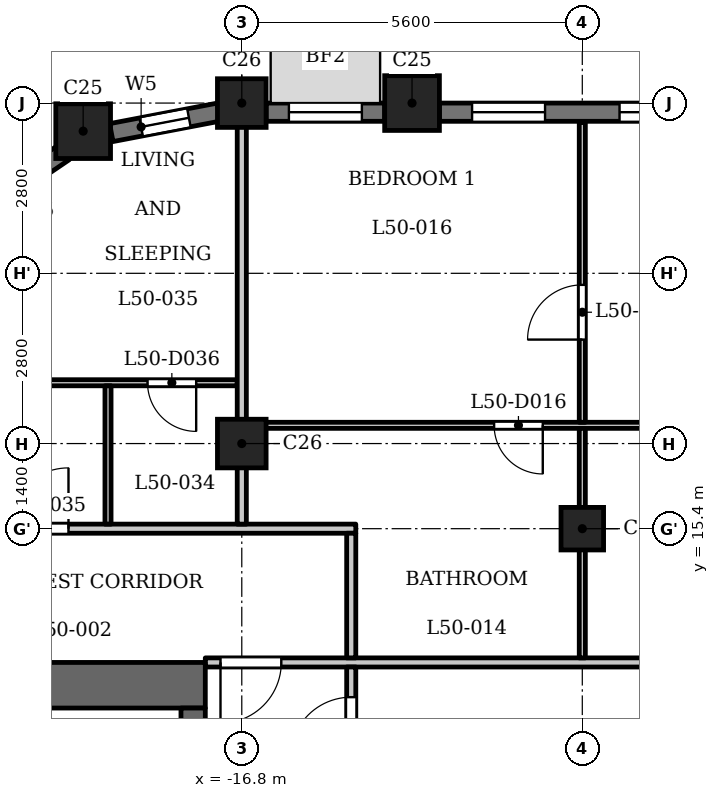
"""IFC4 building model, lengths in metres.
Left out: names, types, materials, properties, quantities, classifications, styles, units other than length and angle.
Written with IfcOpenShell. Run it as: python <this file> out.ifc"""

import sys

from ifc_helpers import new_model, si_unit, direction, frame, frame_2d, origin, origin_2d, place, context, subcontext, project, spatial, rectangle, extrude, element, fill, save


model = new_model("IFC4")
c1 = context("Model", 3, precision=1e-05, world=origin(), true_north=direction((0.0, 1.0)))
c2 = subcontext(c1, "Body", "Model", "MODEL_VIEW")
j1 = project(units=[si_unit("LENGTHUNIT", "METRE"), si_unit("PLANEANGLEUNIT", "RADIAN")], contexts=[c1])
p1 = place(None, origin())
s1 = spatial("IfcSite", under=j1, at=p1, CompositionType="ELEMENT")
p2 = place(p1, origin())
s2 = spatial("IfcBuilding", under=s1, at=p2, CompositionType="ELEMENT")
p3 = place(p2, frame((0.0, 0.0, 195.9)))
s3 = spatial("IfcBuildingStorey", under=s2, at=p3, CompositionType="ELEMENT", Elevation=195.9)
for number, where, z_axis, x_axis in (
    (1, (-14.0, 22.4, 0.0), (0.0, 0.0, 1.0), (1.0, 0.0, 0.0)),
    (2, (-19.409, 21.938, 0.0), (0.0, 0.0, 1.0), (1.0, 0.0, 0.0)),
):
    element("IfcColumn", number, at=place(p3, frame(where, z_axis=z_axis, x_axis=x_axis)), inside=s3, PredefinedType="COLUMN", context=c2, shape_type="SweptSolid", body=[
        extrude(rectangle(XDim=0.9, YDim=0.9, at=origin_2d()), origin(), (0.0, 0.0, 1.0), 3.5),
    ])
for number, where, z_axis, x_axis in (
    (3, (-16.8, 16.8, 0.0), (0.0, 0.0, 1.0), (1.0, 0.0, 0.0)),
    (4, (-16.8, 22.4, 0.0), (0.0, 0.0, 1.0), (1.0, 0.0, 0.0)),
):
    element("IfcColumn", number, at=place(p3, frame(where, z_axis=z_axis, x_axis=x_axis)), inside=s3, PredefinedType="COLUMN", context=c2, shape_type="SweptSolid", body=[
        extrude(rectangle(XDim=0.8, YDim=0.8, at=origin_2d()), origin(), (0.0, 0.0, 1.0), 3.5),
    ])
p4 = place(p3, frame((-11.2, 15.4, 0.0), z_axis=(0.0, 0.0, 1.0), x_axis=(1.0, 0.0, 0.0)))
e5 = element("IfcColumn", 5, at=p4, inside=s3, PredefinedType="COLUMN", context=c2, shape_type="SweptSolid", body=[
    extrude(rectangle(XDim=0.7, YDim=0.7, at=origin_2d()), origin(), (0.0, 0.0, 1.0), 3.5),
])
p5 = place(p3, frame((-8.85, 22.25, 0.0), z_axis=(0.0, 0.0, 1.0), x_axis=(-1.0, 0.0, 0.0)))
e6 = element("IfcWall", 6, at=p5, inside=s3, PredefinedType="SOLIDWALL", context=c2, shape_type="SweptSolid", body=[
    extrude(rectangle(XDim=4.7, YDim=0.3, at=frame_2d((2.35, 0.0))), origin(), (0.0, 0.0, 1.0), 2.5),
])
p6 = place(p5, frame((0.538, 0.0, 0.6)))
e7 = element("IfcOpeningElement", 7, at=p6, cuts=e6, PredefinedType="OPENING", context=c2, shape_type="SweptSolid", body=[
    extrude(rectangle(XDim=1.2, YDim=1.55, at=frame_2d((0.6, 0.775))), frame((0.0, 0.16, 0.0), z_axis=(0.0, -1.0, 0.0), x_axis=(1.0, 0.0, 0.0)), (0.0, 0.0, 1.0), 0.32),
])
p7 = place(p5, frame((2.962, 0.0, 0.6)))
e8 = element("IfcOpeningElement", 8, at=p7, cuts=e6, PredefinedType="OPENING", context=c2, shape_type="SweptSolid", body=[
    extrude(rectangle(XDim=1.2, YDim=1.55, at=frame_2d((0.6, 0.775))), frame((0.0, 0.16, 0.0), z_axis=(0.0, -1.0, 0.0), x_axis=(1.0, 0.0, 0.0)), (0.0, 0.0, 1.0), 0.32),
])
p8 = place(p3, frame((-14.45, 22.25, 0.0), z_axis=(0.0, 0.0, 1.0), x_axis=(-1.0, 0.0, 0.0)))
e9 = element("IfcWall", 9, at=p8, inside=s3, PredefinedType="SOLIDWALL", context=c2, shape_type="SweptSolid", body=[
    extrude(rectangle(XDim=1.95, YDim=0.3, at=frame_2d((0.975, 0.0))), origin(), (0.0, 0.0, 1.0), 2.5),
])
p9 = place(p8, frame((0.375, 0.0, 0.6)))
e10 = element("IfcOpeningElement", 10, at=p9, cuts=e9, PredefinedType="OPENING", context=c2, shape_type="SweptSolid", body=[
    extrude(rectangle(XDim=1.2, YDim=1.55, at=frame_2d((0.6, 0.775))), frame((0.0, 0.16, 0.0), z_axis=(0.0, -1.0, 0.0), x_axis=(1.0, 0.0, 0.0)), (0.0, 0.0, 1.0), 0.32),
])
p10 = place(p3, frame((-17.179, 22.251, 0.0), z_axis=(0.0, 0.0, 1.0), x_axis=(-0.98230529033, -0.187286722942, 0.0)))
e11 = element("IfcWall", 11, at=p10, inside=s3, PredefinedType="SOLIDWALL", context=c2, shape_type="SweptSolid", body=[
    extrude(rectangle(XDim=1.799, YDim=0.3, at=frame_2d((0.899, 0.0))), origin(), (0.0, 0.0, 1.0), 2.5),
])
p11 = place(p10, frame((0.5, 0.0, 0.6)))
e12 = element("IfcOpeningElement", 12, at=p11, cuts=e11, PredefinedType="OPENING", context=c2, shape_type="SweptSolid", body=[
    extrude(rectangle(XDim=0.8, YDim=1.55, at=frame_2d((0.4, 0.775))), frame((0.0, 0.16, 0.0), z_axis=(0.0, -1.0, 0.0), x_axis=(1.0, 0.0, 0.0)), (0.0, 0.0, 1.0), 0.32),
])
p12 = place(p3, frame((-19.719, 21.594, 0.0), z_axis=(0.0, 0.0, 1.0), x_axis=(-0.827067282455, -0.562102935673, 0.0)))
e13 = element("IfcWall", 13, at=p12, inside=s3, PredefinedType="SOLIDWALL", context=c2, shape_type="SweptSolid", body=[
    extrude(rectangle(XDim=1.806, YDim=0.3, at=frame_2d((0.903, 0.0))), origin(), (0.0, 0.0, 1.0), 2.5),
])
p13 = place(p12, frame((0.503, 0.0, 0.6)))
e14 = element("IfcOpeningElement", 14, at=p13, cuts=e13, PredefinedType="OPENING", context=c2, shape_type="SweptSolid", body=[
    extrude(rectangle(XDim=0.8, YDim=1.55, at=frame_2d((0.4, 0.775))), frame((0.0, 0.16, 0.0), z_axis=(0.0, -1.0, 0.0), x_axis=(1.0, 0.0, 0.0)), (0.0, 0.0, 1.0), 0.32),
])
p14 = place(p3, frame((-17.4, 12.825, 0.0), z_axis=(0.0, 0.0, 1.0), x_axis=(-1.0, 0.0, 0.0)))
e15 = element("IfcWall", 15, at=p14, inside=s3, PredefinedType="SHEAR", context=c2, shape_type="SweptSolid", body=[
    extrude(rectangle(XDim=7.6, YDim=0.75, at=frame_2d((3.8, 0.0))), origin(), (0.0, 0.0, 1.0), 3.2),
])
p15 = place(p3, frame((-17.6, -12.45, 0.0), z_axis=(0.0, 0.0, 1.0), x_axis=(0.0, 1.0, 0.0)))
e16 = element("IfcWall", 16, at=p15, inside=s3, PredefinedType="SHEAR", context=c2, shape_type="SweptSolid", body=[
    extrude(rectangle(XDim=24.9, YDim=0.4, at=frame_2d((12.45, 0.0))), origin(), (0.0, 0.0, 1.0), 3.2),
])
p16 = place(p15, frame((6.325, 0.0, 0.0)))
e17 = element("IfcOpeningElement", 17, at=p16, cuts=e16, PredefinedType="OPENING", context=c2, shape_type="SweptSolid", body=[
    extrude(rectangle(XDim=0.9, YDim=2.1, at=frame_2d((0.45, 1.05))), frame((0.0, 0.21, 0.0), z_axis=(0.0, -1.0, 0.0), x_axis=(1.0, 0.0, 0.0)), (0.0, 0.0, 1.0), 0.42),
])
p17 = place(p15, frame((9.925, 0.0, 0.0)))
e18 = element("IfcOpeningElement", 18, at=p17, cuts=e16, PredefinedType="OPENING", context=c2, shape_type="SweptSolid", body=[
    extrude(rectangle(XDim=0.9, YDim=2.1, at=frame_2d((0.45, 1.05))), frame((0.0, 0.21, 0.0), z_axis=(0.0, -1.0, 0.0), x_axis=(1.0, 0.0, 0.0)), (0.0, 0.0, 1.0), 0.42),
])
p18 = place(p15, frame((15.6, 0.0, 0.0)))
e19 = element("IfcOpeningElement", 19, at=p18, cuts=e16, PredefinedType="OPENING", context=c2, shape_type="SweptSolid", body=[
    extrude(rectangle(XDim=1.1, YDim=2.1, at=frame_2d((0.55, 1.05))), frame((0.0, 0.21, 0.0), z_axis=(0.0, -1.0, 0.0), x_axis=(1.0, 0.0, 0.0)), (0.0, 0.0, 1.0), 0.42),
])
p19 = place(p15, frame((18.0, 0.0, 0.0)))
e20 = element("IfcOpeningElement", 20, at=p19, cuts=e16, PredefinedType="OPENING", context=c2, shape_type="SweptSolid", body=[
    extrude(rectangle(XDim=1.1, YDim=2.1, at=frame_2d((0.55, 1.05))), frame((0.0, 0.21, 0.0), z_axis=(0.0, -1.0, 0.0), x_axis=(1.0, 0.0, 0.0)), (0.0, 0.0, 1.0), 0.42),
])
p20 = place(p15, frame((23.025, 0.0, 0.0)))
e21 = element("IfcOpeningElement", 21, at=p20, cuts=e16, PredefinedType="OPENING", context=c2, shape_type="SweptSolid", body=[
    extrude(rectangle(XDim=1.1, YDim=2.1, at=frame_2d((0.55, 1.05))), frame((0.0, 0.21, 0.0), z_axis=(0.0, -1.0, 0.0), x_axis=(1.0, 0.0, 0.0)), (0.0, 0.0, 1.0), 0.42),
])
p21 = place(p15, frame((0.775, 0.0, 0.0)))
e22 = element("IfcOpeningElement", 22, at=p21, cuts=e16, PredefinedType="OPENING", context=c2, shape_type="SweptSolid", body=[
    extrude(rectangle(XDim=1.1, YDim=2.1, at=frame_2d((0.55, 1.05))), frame((0.0, 0.21, 0.0), z_axis=(0.0, -1.0, 0.0), x_axis=(1.0, 0.0, 0.0)), (0.0, 0.0, 1.0), 0.42),
])
p22 = place(p15, frame((12.925, 0.0, 0.0)))
e23 = element("IfcOpeningElement", 23, at=p22, cuts=e16, PredefinedType="OPENING", context=c2, shape_type="SweptSolid", body=[
    extrude(rectangle(XDim=1.8, YDim=2.1, at=frame_2d((0.9, 1.05))), frame((0.0, 0.21, 0.0), z_axis=(0.0, -1.0, 0.0), x_axis=(1.0, 0.0, 0.0)), (0.0, 0.0, 1.0), 0.42),
])
p23 = place(p3, frame((-17.4, 13.2, 0.0), z_axis=(0.0, 0.0, 1.0), x_axis=(1.0, 0.0, 0.0)))
e24 = element("IfcWall", 24, at=p23, inside=s3, PredefinedType="PARTITIONING", context=c2, shape_type="SweptSolid", body=[
    extrude(rectangle(XDim=34.8, YDim=0.15, at=frame_2d((17.4, 0.0))), origin(), (0.0, 0.0, 1.0), 3.2),
])
p24 = place(p23, frame((0.25, 0.0, 0.0)))
e25 = element("IfcOpeningElement", 25, at=p24, cuts=e24, PredefinedType="OPENING", context=c2, shape_type="SweptSolid", body=[
    extrude(rectangle(XDim=1.0, YDim=2.1, at=frame_2d((0.5, 1.05))), frame((0.0, 0.085, 0.0), z_axis=(0.0, -1.0, 0.0), x_axis=(1.0, 0.0, 0.0)), (0.0, 0.0, 1.0), 0.17),
])
p25 = place(p23, frame((33.65, 0.0, 0.0)))
e26 = element("IfcOpeningElement", 26, at=p25, cuts=e24, PredefinedType="OPENING", context=c2, shape_type="SweptSolid", body=[
    extrude(rectangle(XDim=1.0, YDim=2.1, at=frame_2d((0.5, 1.05))), frame((0.0, 0.085, 0.0), z_axis=(0.0, -1.0, 0.0), x_axis=(1.0, 0.0, 0.0)), (0.0, 0.0, 1.0), 0.17),
])
p26 = place(p23, frame((10.15, 0.0, 0.0)))
e27 = element("IfcOpeningElement", 27, at=p26, cuts=e24, PredefinedType="OPENING", context=c2, shape_type="SweptSolid", body=[
    extrude(rectangle(XDim=1.0, YDim=2.1, at=frame_2d((0.5, 1.05))), frame((0.0, 0.085, 0.0), z_axis=(0.0, -1.0, 0.0), x_axis=(1.0, 0.0, 0.0)), (0.0, 0.0, 1.0), 0.17),
])
p27 = place(p23, frame((13.55, 0.0, 0.0)))
e28 = element("IfcOpeningElement", 28, at=p27, cuts=e24, PredefinedType="OPENING", context=c2, shape_type="SweptSolid", body=[
    extrude(rectangle(XDim=1.0, YDim=2.1, at=frame_2d((0.5, 1.05))), frame((0.0, 0.085, 0.0), z_axis=(0.0, -1.0, 0.0), x_axis=(1.0, 0.0, 0.0)), (0.0, 0.0, 1.0), 0.17),
])
p28 = place(p23, frame((20.85, 0.0, 0.0)))
e29 = element("IfcOpeningElement", 29, at=p28, cuts=e24, PredefinedType="OPENING", context=c2, shape_type="SweptSolid", body=[
    extrude(rectangle(XDim=1.0, YDim=2.1, at=frame_2d((0.5, 1.05))), frame((0.0, 0.085, 0.0), z_axis=(0.0, -1.0, 0.0), x_axis=(1.0, 0.0, 0.0)), (0.0, 0.0, 1.0), 0.17),
])
p29 = place(p23, frame((23.7, 0.0, 0.0)))
e30 = element("IfcOpeningElement", 30, at=p29, cuts=e24, PredefinedType="OPENING", context=c2, shape_type="SweptSolid", body=[
    extrude(rectangle(XDim=1.0, YDim=2.1, at=frame_2d((0.5, 1.05))), frame((0.0, 0.085, 0.0), z_axis=(0.0, -1.0, 0.0), x_axis=(1.0, 0.0, 0.0)), (0.0, 0.0, 1.0), 0.17),
])
p30 = place(p3, frame((-24.684, 15.4, 0.0), z_axis=(0.0, 0.0, 1.0), x_axis=(1.0, 0.0, 0.0)))
e31 = element("IfcWall", 31, at=p30, inside=s3, PredefinedType="PARTITIONING", context=c2, shape_type="SweptSolid", body=[
    extrude(rectangle(XDim=9.759, YDim=0.15, at=frame_2d((4.879, 0.0))), origin(), (0.0, 0.0, 1.0), 3.2),
])
p31 = place(p30, frame((4.034, 0.0, 0.0)))
e32 = element("IfcOpeningElement", 32, at=p31, cuts=e31, PredefinedType="OPENING", context=c2, shape_type="SweptSolid", body=[
    extrude(rectangle(XDim=1.0, YDim=2.1, at=frame_2d((0.5, 1.05))), frame((0.0, 0.085, 0.0), z_axis=(0.0, -1.0, 0.0), x_axis=(1.0, 0.0, 0.0)), (0.0, 0.0, 1.0), 0.17),
])
p32 = place(p3, frame((-16.725, 17.1, 0.0), z_axis=(0.0, 0.0, 1.0), x_axis=(1.0, 0.0, 0.0)))
e33 = element("IfcWall", 33, at=p32, inside=s3, PredefinedType="PARTITIONING", context=c2, shape_type="SweptSolid", body=[
    extrude(rectangle(XDim=33.45, YDim=0.1, at=frame_2d((16.725, 0.0))), origin(), (0.0, 0.0, 1.0), 3.2),
])
p33 = place(p32, frame((4.075, 0.0, 0.0)))
e34 = element("IfcOpeningElement", 34, at=p33, cuts=e33, PredefinedType="OPENING", context=c2, shape_type="SweptSolid", body=[
    extrude(rectangle(XDim=0.8, YDim=2.1, at=frame_2d((0.4, 1.05))), frame((0.0, 0.06, 0.0), z_axis=(0.0, -1.0, 0.0), x_axis=(1.0, 0.0, 0.0)), (0.0, 0.0, 1.0), 0.12),
])
p34 = place(p32, frame((9.575, 0.0, 0.0)))
e35 = element("IfcOpeningElement", 35, at=p34, cuts=e33, PredefinedType="OPENING", context=c2, shape_type="SweptSolid", body=[
    extrude(rectangle(XDim=0.9, YDim=2.1, at=frame_2d((0.45, 1.05))), frame((0.0, 0.06, 0.0), z_axis=(0.0, -1.0, 0.0), x_axis=(1.0, 0.0, 0.0)), (0.0, 0.0, 1.0), 0.12),
])
p35 = place(p32, frame((15.175, 0.0, 0.0)))
e36 = element("IfcOpeningElement", 36, at=p35, cuts=e33, PredefinedType="OPENING", context=c2, shape_type="SweptSolid", body=[
    extrude(rectangle(XDim=0.8, YDim=2.1, at=frame_2d((0.4, 1.05))), frame((0.0, 0.06, 0.0), z_axis=(0.0, -1.0, 0.0), x_axis=(1.0, 0.0, 0.0)), (0.0, 0.0, 1.0), 0.12),
])
p36 = place(p32, frame((12.975, 0.0, 0.0)))
e37 = element("IfcOpeningElement", 37, at=p36, cuts=e33, PredefinedType="OPENING", context=c2, shape_type="SweptSolid", body=[
    extrude(rectangle(XDim=0.9, YDim=2.1, at=frame_2d((0.45, 1.05))), frame((0.0, 0.06, 0.0), z_axis=(0.0, -1.0, 0.0), x_axis=(1.0, 0.0, 0.0)), (0.0, 0.0, 1.0), 0.12),
])
p37 = place(p32, frame((17.625, 0.0, 0.0)))
e38 = element("IfcOpeningElement", 38, at=p37, cuts=e33, PredefinedType="OPENING", context=c2, shape_type="SweptSolid", body=[
    extrude(rectangle(XDim=0.8, YDim=2.1, at=frame_2d((0.4, 1.05))), frame((0.0, 0.06, 0.0), z_axis=(0.0, -1.0, 0.0), x_axis=(1.0, 0.0, 0.0)), (0.0, 0.0, 1.0), 0.12),
])
p38 = place(p32, frame((20.025, 0.0, 0.0)))
e39 = element("IfcOpeningElement", 39, at=p38, cuts=e33, PredefinedType="OPENING", context=c2, shape_type="SweptSolid", body=[
    extrude(rectangle(XDim=0.9, YDim=2.1, at=frame_2d((0.45, 1.05))), frame((0.0, 0.06, 0.0), z_axis=(0.0, -1.0, 0.0), x_axis=(1.0, 0.0, 0.0)), (0.0, 0.0, 1.0), 0.12),
])
p39 = place(p32, frame((31.975, 0.0, 0.0)))
e40 = element("IfcOpeningElement", 40, at=p39, cuts=e33, PredefinedType="OPENING", context=c2, shape_type="SweptSolid", body=[
    extrude(rectangle(XDim=0.8, YDim=2.1, at=frame_2d((0.4, 1.05))), frame((0.0, 0.06, 0.0), z_axis=(0.0, -1.0, 0.0), x_axis=(1.0, 0.0, 0.0)), (0.0, 0.0, 1.0), 0.12),
])
p40 = place(p32, frame((29.775, 0.0, 0.0)))
e41 = element("IfcOpeningElement", 41, at=p40, cuts=e33, PredefinedType="OPENING", context=c2, shape_type="SweptSolid", body=[
    extrude(rectangle(XDim=0.9, YDim=2.1, at=frame_2d((0.45, 1.05))), frame((0.0, 0.06, 0.0), z_axis=(0.0, -1.0, 0.0), x_axis=(1.0, 0.0, 0.0)), (0.0, 0.0, 1.0), 0.12),
])
p41 = place(p32, frame((23.025, 0.0, 0.0)))
e42 = element("IfcOpeningElement", 42, at=p41, cuts=e33, PredefinedType="OPENING", context=c2, shape_type="SweptSolid", body=[
    extrude(rectangle(XDim=0.9, YDim=2.1, at=frame_2d((0.45, 1.05))), frame((0.0, 0.06, 0.0), z_axis=(0.0, -1.0, 0.0), x_axis=(1.0, 0.0, 0.0)), (0.0, 0.0, 1.0), 0.12),
])
p42 = place(p32, frame((26.125, 0.0, 0.0)))
e43 = element("IfcOpeningElement", 43, at=p42, cuts=e33, PredefinedType="OPENING", context=c2, shape_type="SweptSolid", body=[
    extrude(rectangle(XDim=0.9, YDim=2.1, at=frame_2d((0.45, 1.05))), frame((0.0, 0.06, 0.0), z_axis=(0.0, -1.0, 0.0), x_axis=(1.0, 0.0, 0.0)), (0.0, 0.0, 1.0), 0.12),
])
p43 = place(p3, frame((-23.594, 17.8, 0.0), z_axis=(0.0, 0.0, 1.0), x_axis=(1.0, 0.0, 0.0)))
e44 = element("IfcWall", 44, at=p43, inside=s3, PredefinedType="PARTITIONING", context=c2, shape_type="SweptSolid", body=[
    extrude(rectangle(XDim=6.719, YDim=0.1, at=frame_2d((3.359, 0.0))), origin(), (0.0, 0.0, 1.0), 3.2),
])
p44 = place(p43, frame((5.244, 0.0, 0.0)))
e45 = element("IfcOpeningElement", 45, at=p44, cuts=e44, PredefinedType="OPENING", context=c2, shape_type="SweptSolid", body=[
    extrude(rectangle(XDim=0.8, YDim=2.1, at=frame_2d((0.4, 1.05))), frame((0.0, 0.06, 0.0), z_axis=(0.0, -1.0, 0.0), x_axis=(1.0, 0.0, 0.0)), (0.0, 0.0, 1.0), 0.12),
])
p45 = place(p43, frame((2.044, 0.0, 0.0)))
e46 = element("IfcOpeningElement", 46, at=p45, cuts=e44, PredefinedType="OPENING", context=c2, shape_type="SweptSolid", body=[
    extrude(rectangle(XDim=0.9, YDim=2.1, at=frame_2d((0.45, 1.05))), frame((0.0, 0.06, 0.0), z_axis=(0.0, -1.0, 0.0), x_axis=(1.0, 0.0, 0.0)), (0.0, 0.0, 1.0), 0.12),
])
p46 = place(p3, frame((-19.0, 15.475, 0.0), z_axis=(0.0, 0.0, 1.0), x_axis=(0.0, 1.0, 0.0)))
e47 = element("IfcWall", 47, at=p46, inside=s3, PredefinedType="PARTITIONING", context=c2, shape_type="SweptSolid", body=[
    extrude(rectangle(XDim=2.275, YDim=0.1, at=frame_2d((1.137, 0.0))), origin(), (0.0, 0.0, 1.0), 3.2),
])
p47 = place(p3, frame((-16.8, 15.475, 0.0), z_axis=(0.0, 0.0, 1.0), x_axis=(0.0, 1.0, 0.0)))
e48 = element("IfcWall", 48, at=p47, inside=s3, PredefinedType="PARTITIONING", context=c2, shape_type="SweptSolid", body=[
    extrude(rectangle(XDim=6.835, YDim=0.15, at=frame_2d((3.417, 0.0))), origin(), (0.0, 0.0, 1.0), 2.55),
])
p48 = place(p3, frame((-15.0, 6.769, 0.0), z_axis=(0.0, 0.0, 1.0), x_axis=(0.0, 1.0, 0.0)))
e49 = element("IfcWall", 49, at=p48, inside=s3, PredefinedType="PARTITIONING", context=c2, shape_type="SweptSolid", body=[
    extrude(rectangle(XDim=6.356, YDim=0.15, at=frame_2d((3.178, 0.0))), origin(), (0.0, 0.0, 1.0), 3.2),
])
p49 = place(p48, frame((4.86, 0.0, 0.0)))
e50 = element("IfcOpeningElement", 50, at=p49, cuts=e49, PredefinedType="OPENING", context=c2, shape_type="SweptSolid", body=[
    extrude(rectangle(XDim=1.0, YDim=2.1, at=frame_2d((0.5, 1.05))), frame((0.0, 0.085, 0.0), z_axis=(0.0, -1.0, 0.0), x_axis=(1.0, 0.0, 0.0)), (0.0, 0.0, 1.0), 0.17),
])
p50 = place(p3, frame((-15.0, 13.275, 0.0), z_axis=(0.0, 0.0, 1.0), x_axis=(0.0, 1.0, 0.0)))
e51 = element("IfcWall", 51, at=p50, inside=s3, PredefinedType="PARTITIONING", context=c2, shape_type="SweptSolid", body=[
    extrude(rectangle(XDim=2.05, YDim=0.15, at=frame_2d((1.025, 0.0))), origin(), (0.0, 0.0, 1.0), 3.2),
])
p51 = place(p3, frame((-11.2, 13.275, 0.0), z_axis=(0.0, 0.0, 1.0), x_axis=(0.0, 1.0, 0.0)))
e52 = element("IfcWall", 52, at=p51, inside=s3, PredefinedType="PARTITIONING", context=c2, shape_type="SweptSolid", body=[
    extrude(rectangle(XDim=3.775, YDim=0.1, at=frame_2d((1.888, 0.0))), origin(), (0.0, 0.0, 1.0), 3.2),
])
p52 = place(p3, frame((-11.2, 17.15, 0.0), z_axis=(0.0, 0.0, 1.0), x_axis=(0.0, 1.0, 0.0)))
e53 = element("IfcWall", 53, at=p52, inside=s3, PredefinedType="PARTITIONING", context=c2, shape_type="SweptSolid", body=[
    extrude(rectangle(XDim=4.93, YDim=0.1, at=frame_2d((2.465, 0.0))), origin(), (0.0, 0.0, 1.0), 3.2),
])
p53 = place(p52, frame((1.36, 0.0, 0.0)))
e54 = element("IfcOpeningElement", 54, at=p53, cuts=e53, PredefinedType="OPENING", context=c2, shape_type="SweptSolid", body=[
    extrude(rectangle(XDim=0.9, YDim=2.1, at=frame_2d((0.45, 1.05))), frame((0.0, 0.06, 0.0), z_axis=(0.0, -1.0, 0.0), x_axis=(1.0, 0.0, 0.0)), (0.0, 0.0, 1.0), 0.12),
])
p54 = place(p49, origin())
e55 = element("IfcDoor", 55, at=p54, inside=s3, OperationType="SINGLE_SWING_RIGHT", PredefinedType="DOOR", context=c2, shape_type="SweptSolid", body=[
    extrude(rectangle(XDim=1.0, YDim=2.1, at=frame_2d((0.5, 1.05))), frame((0.0, 0.025, 0.0), z_axis=(0.0, -1.0, 0.0), x_axis=(1.0, 0.0, 0.0)), (0.0, 0.0, 1.0), 0.05),
])
fill(e50, e55)
p55 = place(p24, origin())
e56 = element("IfcDoor", 56, at=p55, inside=s3, OperationType="SINGLE_SWING_LEFT", PredefinedType="DOOR", context=c2, shape_type="SweptSolid", body=[
    extrude(rectangle(XDim=1.0, YDim=2.1, at=frame_2d((0.5, 1.05))), frame((0.0, 0.025, 0.0), z_axis=(0.0, -1.0, 0.0), x_axis=(1.0, 0.0, 0.0)), (0.0, 0.0, 1.0), 0.05),
])
fill(e25, e56)
p56 = place(p33, origin())
e57 = element("IfcDoor", 57, at=p56, inside=s3, OperationType="SINGLE_SWING_RIGHT", PredefinedType="DOOR", context=c2, shape_type="SweptSolid", body=[
    extrude(rectangle(XDim=0.8, YDim=2.1, at=frame_2d((0.4, 1.05))), frame((0.0, 0.025, 0.0), z_axis=(0.0, -1.0, 0.0), x_axis=(1.0, 0.0, 0.0)), (0.0, 0.0, 1.0), 0.05),
])
fill(e34, e57)
p57 = place(p53, origin())
e58 = element("IfcDoor", 58, at=p57, inside=s3, OperationType="SINGLE_SWING_RIGHT", PredefinedType="DOOR", context=c2, shape_type="SweptSolid", body=[
    extrude(rectangle(XDim=0.9, YDim=2.1, at=frame_2d((0.45, 1.05))), frame((0.0, 0.025, 0.0), z_axis=(0.0, -1.0, 0.0), x_axis=(1.0, 0.0, 0.0)), (0.0, 0.0, 1.0), 0.05),
])
fill(e54, e58)
p58 = place(p31, origin())
e59 = element("IfcDoor", 59, at=p58, inside=s3, OperationType="SINGLE_SWING_LEFT", PredefinedType="DOOR", context=c2, shape_type="SweptSolid", body=[
    extrude(rectangle(XDim=1.0, YDim=2.1, at=frame_2d((0.5, 1.05))), frame((0.0, 0.025, 0.0), z_axis=(0.0, -1.0, 0.0), x_axis=(1.0, 0.0, 0.0)), (0.0, 0.0, 1.0), 0.05),
])
fill(e32, e59)
p59 = place(p44, origin())
e60 = element("IfcDoor", 60, at=p59, inside=s3, OperationType="SINGLE_SWING_RIGHT", PredefinedType="DOOR", context=c2, shape_type="SweptSolid", body=[
    extrude(rectangle(XDim=0.8, YDim=2.1, at=frame_2d((0.4, 1.05))), frame((0.0, 0.025, 0.0), z_axis=(0.0, -1.0, 0.0), x_axis=(1.0, 0.0, 0.0)), (0.0, 0.0, 1.0), 0.05),
])
fill(e45, e60)
p60 = place(p6, origin())
e61 = element("IfcWindow", 61, at=p60, inside=s3, PartitioningType="SINGLE_PANEL", PredefinedType="WINDOW", context=c2, shape_type="SweptSolid", body=[
    extrude(rectangle(XDim=1.2, YDim=1.55, at=frame_2d((0.6, 0.775))), frame((0.0, 0.03, 0.0), z_axis=(0.0, -1.0, 0.0), x_axis=(1.0, 0.0, 0.0)), (0.0, 0.0, 1.0), 0.06),
])
fill(e7, e61)
p61 = place(p7, origin())
e62 = element("IfcWindow", 62, at=p61, inside=s3, PartitioningType="SINGLE_PANEL", PredefinedType="WINDOW", context=c2, shape_type="SweptSolid", body=[
    extrude(rectangle(XDim=1.2, YDim=1.55, at=frame_2d((0.6, 0.775))), frame((0.0, 0.03, 0.0), z_axis=(0.0, -1.0, 0.0), x_axis=(1.0, 0.0, 0.0)), (0.0, 0.0, 1.0), 0.06),
])
fill(e8, e62)
p62 = place(p9, origin())
e63 = element("IfcWindow", 63, at=p62, inside=s3, PartitioningType="SINGLE_PANEL", PredefinedType="WINDOW", context=c2, shape_type="SweptSolid", body=[
    extrude(rectangle(XDim=1.2, YDim=1.55, at=frame_2d((0.6, 0.775))), frame((0.0, 0.03, 0.0), z_axis=(0.0, -1.0, 0.0), x_axis=(1.0, 0.0, 0.0)), (0.0, 0.0, 1.0), 0.06),
])
fill(e10, e63)
p63 = place(p11, origin())
e64 = element("IfcWindow", 64, at=p63, inside=s3, PartitioningType="SINGLE_PANEL", PredefinedType="WINDOW", context=c2, shape_type="SweptSolid", body=[
    extrude(rectangle(XDim=0.8, YDim=1.55, at=frame_2d((0.4, 0.775))), frame((0.0, 0.03, 0.0), z_axis=(0.0, -1.0, 0.0), x_axis=(1.0, 0.0, 0.0)), (0.0, 0.0, 1.0), 0.06),
])
fill(e12, e64)
save(model, sys.argv[1])
